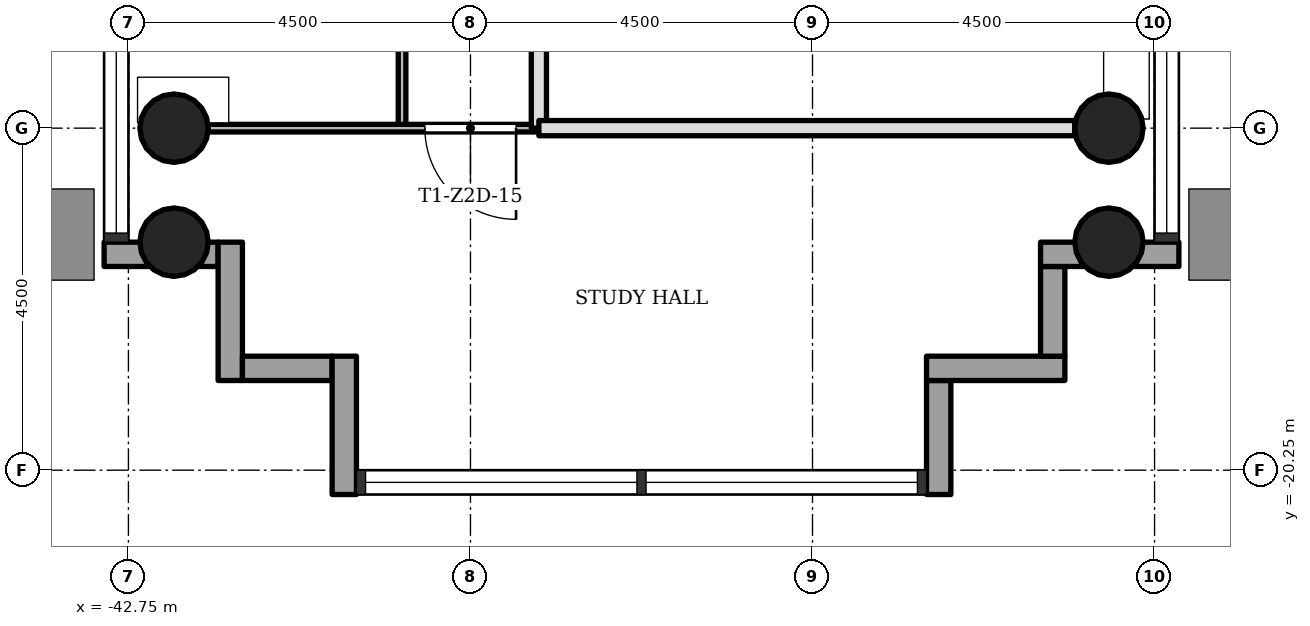
"""IFC4 building model, lengths in metres.
Left out: names, types, materials, properties, quantities, classifications, styles, units other than length and angle.
Written with IfcOpenShell. Run it as: python <this file> out.ifc"""

import sys

from ifc_helpers import new_model, si_unit, direction, frame, frame_2d, origin, origin_2d, place, context, subcontext, project, spatial, rectangle, hollow_circle, extrude, element, fill, save


model = new_model("IFC4")
c1 = context("Model", 3, precision=1e-05, world=origin(), true_north=direction((0.0, 1.0)))
c2 = subcontext(c1, "Body", "Model", "MODEL_VIEW")
j1 = project(units=[si_unit("LENGTHUNIT", "METRE"), si_unit("PLANEANGLEUNIT", "RADIAN")], contexts=[c1])
p1 = place(None, origin())
s1 = spatial("IfcSite", under=j1, at=p1, CompositionType="ELEMENT")
p2 = place(p1, origin())
s2 = spatial("IfcBuilding", under=s1, at=p2, CompositionType="ELEMENT")
p3 = place(p2, frame((0.0, 0.0, 120.8)))
s3 = spatial("IfcBuildingStorey", under=s2, at=p3, CompositionType="ELEMENT", Elevation=120.8)
for number, where, z_axis, x_axis in (
    (1, (-42.15, -15.75, 0.0), (0.0, 0.0, 1.0), (1.0, 0.0, 0.0)),
    (2, (-29.85, -15.75, 0.0), (0.0, 0.0, 1.0), (1.0, 0.0, 0.0)),
    (3, (-42.15, -17.25, 0.0), (0.0, 0.0, 1.0), (1.0, 0.0, 0.0)),
    (4, (-29.85, -17.25, 0.0), (0.0, 0.0, 1.0), (1.0, 0.0, 0.0)),
):
    element("IfcColumn", number, at=place(p3, frame(where, z_axis=z_axis, x_axis=x_axis)), inside=s3, PredefinedType="COLUMN", context=c2, shape_type="SweptSolid", body=[
        extrude(hollow_circle(Radius=0.45, WallThickness=0.032, at=origin_2d()), origin(), (0.0, 0.0, 1.0), 3.4),
    ])
p4 = place(p3, frame((-43.07, -17.41, -0.3), z_axis=(0.0, 0.0, 1.0), x_axis=(1.0, 0.0, 0.0)))
e5 = element("IfcWall", 5, at=p4, inside=s3, PredefinedType="STANDARD", context=c2, shape_type="SweptSolid", body=[
    extrude(rectangle(XDim=1.5, YDim=0.32, at=frame_2d((0.75, 0.0))), origin(), (0.0, 0.0, 1.0), 3.4),
])
p5 = place(p3, frame((-41.41, -17.25, -0.3), z_axis=(0.0, 0.0, 1.0), x_axis=(0.0, -1.0, 0.0)))
e6 = element("IfcWall", 6, at=p5, inside=s3, PredefinedType="STANDARD", context=c2, shape_type="SweptSolid", body=[
    extrude(rectangle(XDim=1.82, YDim=0.32, at=frame_2d((0.91, 0.0))), origin(), (0.0, 0.0, 1.0), 3.4),
])
p6 = place(p3, frame((-41.25, -18.91, -0.3), z_axis=(0.0, 0.0, 1.0), x_axis=(1.0, 0.0, 0.0)))
e7 = element("IfcWall", 7, at=p6, inside=s3, PredefinedType="STANDARD", context=c2, shape_type="SweptSolid", body=[
    extrude(rectangle(XDim=1.18, YDim=0.32, at=frame_2d((0.59, 0.0))), origin(), (0.0, 0.0, 1.0), 3.4),
])
p7 = place(p3, frame((-39.91, -18.75, -0.3), z_axis=(0.0, 0.0, 1.0), x_axis=(0.0, -1.0, 0.0)))
e8 = element("IfcWall", 8, at=p7, inside=s3, PredefinedType="STANDARD", context=c2, shape_type="SweptSolid", body=[
    extrude(rectangle(XDim=1.82, YDim=0.32, at=frame_2d((0.91, 0.0))), origin(), (0.0, 0.0, 1.0), 3.4),
])
p8 = place(p3, frame((-32.09, -20.57, -0.3), z_axis=(0.0, 0.0, 1.0), x_axis=(0.0, 1.0, 0.0)))
e9 = element("IfcWall", 9, at=p8, inside=s3, PredefinedType="STANDARD", context=c2, shape_type="SweptSolid", body=[
    extrude(rectangle(XDim=1.5, YDim=0.32, at=frame_2d((0.75, 0.0))), origin(), (0.0, 0.0, 1.0), 3.4),
])
p9 = place(p3, frame((-32.25, -18.91, -0.3), z_axis=(0.0, 0.0, 1.0), x_axis=(1.0, 0.0, 0.0)))
e10 = element("IfcWall", 10, at=p9, inside=s3, PredefinedType="STANDARD", context=c2, shape_type="SweptSolid", body=[
    extrude(rectangle(XDim=1.82, YDim=0.32, at=frame_2d((0.91, 0.0))), origin(), (0.0, 0.0, 1.0), 3.4),
])
p10 = place(p3, frame((-30.59, -18.75, -0.3), z_axis=(0.0, 0.0, 1.0), x_axis=(0.0, 1.0, 0.0)))
e11 = element("IfcWall", 11, at=p10, inside=s3, PredefinedType="STANDARD", context=c2, shape_type="SweptSolid", body=[
    extrude(rectangle(XDim=1.18, YDim=0.32, at=frame_2d((0.59, 0.0))), origin(), (0.0, 0.0, 1.0), 3.4),
])
p11 = place(p3, frame((-30.75, -17.41, -0.3), z_axis=(0.0, 0.0, 1.0), x_axis=(1.0, 0.0, 0.0)))
e12 = element("IfcWall", 12, at=p11, inside=s3, PredefinedType="STANDARD", context=c2, shape_type="SweptSolid", body=[
    extrude(rectangle(XDim=1.82, YDim=0.32, at=frame_2d((0.91, 0.0))), origin(), (0.0, 0.0, 1.0), 3.4),
])
p12 = place(p3, frame((-39.15, -15.75, 0.0), z_axis=(0.0, 0.0, 1.0), x_axis=(0.0, 1.0, 0.0)))
e13 = element("IfcWall", 13, at=p12, inside=s3, PredefinedType="PARTITIONING", context=c2, shape_type="SweptSolid", body=[
    extrude(rectangle(XDim=9.0, YDim=0.1, at=frame_2d((4.5, 0.0))), origin(), (0.0, 0.0, 1.0), 3.0),
])
p13 = place(p12, frame((5.55, 0.0, 0.0)))
e14 = element("IfcOpeningElement", 14, at=p13, cuts=e13, PredefinedType="OPENING", context=c2, shape_type="SweptSolid", body=[
    extrude(rectangle(XDim=0.9, YDim=2.1, at=frame_2d((0.45, 1.05))), frame((0.0, 0.06, 0.0), z_axis=(0.0, -1.0, 0.0), x_axis=(1.0, 0.0, 0.0)), (0.0, 0.0, 1.0), 0.12),
])
p14 = place(p3, frame((-37.35, -15.75, 0.0), z_axis=(0.0, 0.0, 1.0), x_axis=(0.0, 1.0, 0.0)))
e15 = element("IfcWall", 15, at=p14, inside=s3, PredefinedType="SOLIDWALL", context=c2, shape_type="SweptSolid", body=[
    extrude(rectangle(XDim=7.2, YDim=0.2, at=frame_2d((3.6, 0.0))), origin(), (0.0, 0.0, 1.0), 3.0),
])
p15 = place(p14, frame((1.95, 0.0, 0.0)))
e16 = element("IfcOpeningElement", 16, at=p15, cuts=e15, PredefinedType="OPENING", context=c2, shape_type="SweptSolid", body=[
    extrude(rectangle(XDim=0.9, YDim=2.1, at=frame_2d((0.45, 1.05))), frame((0.0, 0.11, 0.0), z_axis=(0.0, -1.0, 0.0), x_axis=(1.0, 0.0, 0.0)), (0.0, 0.0, 1.0), 0.22),
])
p16 = place(p3, frame((-41.7, -15.75, 0.0), z_axis=(0.0, 0.0, 1.0), x_axis=(1.0, 0.0, 0.0)))
e17 = element("IfcWall", 17, at=p16, inside=s3, PredefinedType="PARTITIONING", context=c2, shape_type="SweptSolid", body=[
    extrude(rectangle(XDim=4.35, YDim=0.1, at=frame_2d((2.175, 0.0))), origin(), (0.0, 0.0, 1.0), 3.0),
])
p17 = place(p16, frame((2.85, 0.0, 0.0)))
e18 = element("IfcOpeningElement", 18, at=p17, cuts=e17, PredefinedType="OPENING", context=c2, shape_type="SweptSolid", body=[
    extrude(rectangle(XDim=1.2, YDim=2.1, at=frame_2d((0.6, 1.05))), frame((0.0, 0.06, 0.0), z_axis=(0.0, -1.0, 0.0), x_axis=(1.0, 0.0, 0.0)), (0.0, 0.0, 1.0), 0.12),
])
p18 = place(p3, frame((-37.35, -15.75, 0.0), z_axis=(0.0, 0.0, 1.0), x_axis=(1.0, 0.0, 0.0)))
e19 = element("IfcWall", 19, at=p18, inside=s3, PredefinedType="SOLIDWALL", context=c2, shape_type="SweptSolid", body=[
    extrude(rectangle(XDim=7.05, YDim=0.2, at=frame_2d((3.525, 0.0))), origin(), (0.0, 0.0, 1.0), 3.0),
])
p19 = place(p17, origin())
e20 = element("IfcDoor", 20, at=p19, inside=s3, OperationType="SINGLE_SWING_RIGHT", PredefinedType="DOOR", context=c2, shape_type="SweptSolid", body=[
    extrude(rectangle(XDim=1.2, YDim=2.1, at=frame_2d((0.6, 1.05))), frame((0.0, 0.025, 0.0), z_axis=(0.0, -1.0, 0.0), x_axis=(1.0, 0.0, 0.0)), (0.0, 0.0, 1.0), 0.05),
])
fill(e18, e20)
save(model, sys.argv[1])
